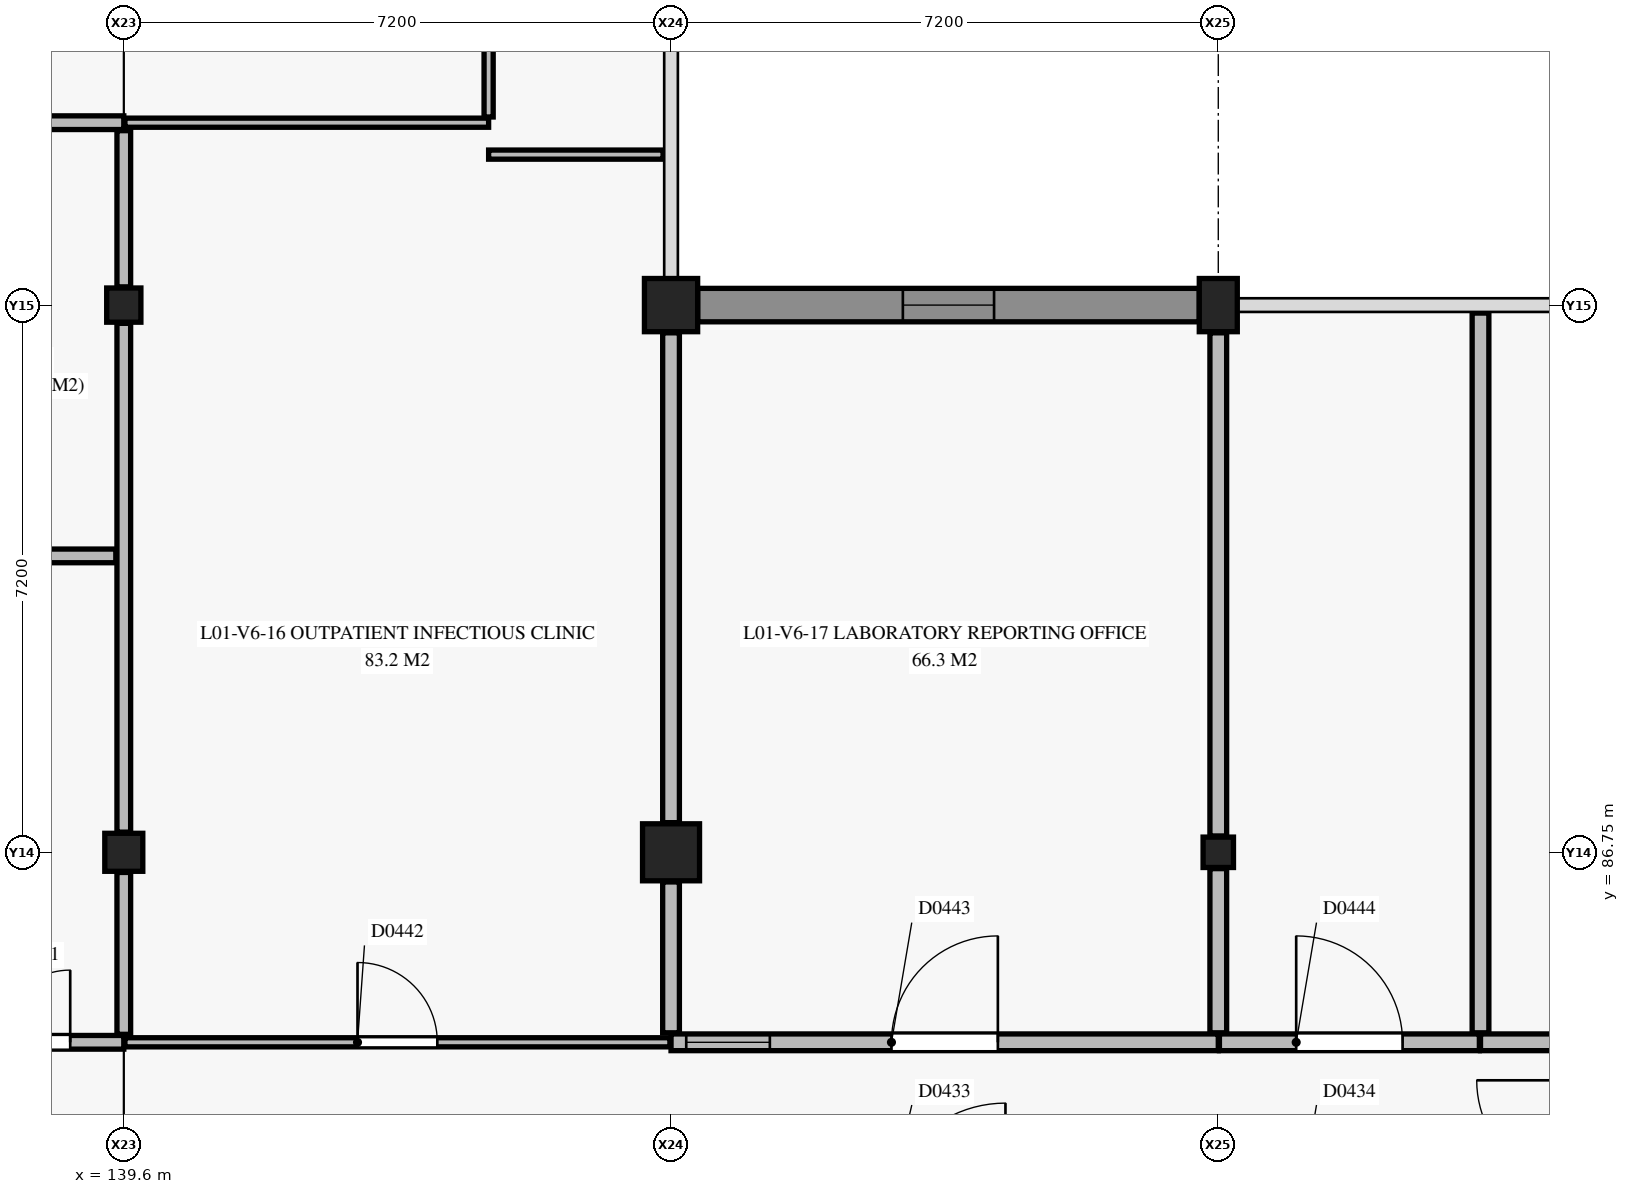
"""IFC4 building model, lengths in metres.
Left out: names, types, materials, properties, quantities, classifications, styles, units other than length and angle.
Written with IfcOpenShell. Run it as: python <this file> out.ifc"""

import sys

from ifc_helpers import new_model, si_unit, direction, frame, frame_2d, origin, origin_2d, place, context, subcontext, project, spatial, rectangle, extrude, element, fill, save


model = new_model("IFC4")
c1 = context("Model", 3, precision=1e-05, world=origin(), true_north=direction((0.0, 1.0)))
c2 = subcontext(c1, "Body", "Model", "MODEL_VIEW")
j1 = project(units=[si_unit("LENGTHUNIT", "METRE"), si_unit("PLANEANGLEUNIT", "RADIAN")], contexts=[c1])
p1 = place(None, origin())
s1 = spatial("IfcSite", under=j1, at=p1, CompositionType="ELEMENT")
p2 = place(p1, origin())
s2 = spatial("IfcBuilding", under=s1, at=p2, CompositionType="ELEMENT")
p3 = place(p2, frame((0.0, 0.0, 4.8)))
s3 = spatial("IfcBuildingStorey", under=s2, at=p3, CompositionType="ELEMENT", Elevation=4.8)
p4 = place(p3, frame((139.6, 86.75, 0.0), z_axis=(0.0, 0.0, 1.0), x_axis=(1.0, 0.0, 0.0)))
e1 = element("IfcColumn", 1, at=p4, inside=s3, PredefinedType="COLUMN", context=c2, shape_type="SweptSolid", body=[
    extrude(rectangle(XDim=0.5, YDim=0.5, at=origin_2d()), origin(), (0.0, 0.0, 1.0), 4.2),
])
p5 = place(p3, frame((139.6, 93.95, 0.0), z_axis=(0.0, 0.0, 1.0), x_axis=(1.0, 0.0, 0.0)))
e2 = element("IfcColumn", 2, at=p5, inside=s3, PredefinedType="COLUMN", context=c2, shape_type="SweptSolid", body=[
    extrude(rectangle(XDim=0.45, YDim=0.45, at=origin_2d()), origin(), (0.0, 0.0, 1.0), 4.2),
])
p6 = place(p3, frame((146.8, 86.75, 0.0), z_axis=(0.0, 0.0, 1.0), x_axis=(1.0, 0.0, 0.0)))
e3 = element("IfcColumn", 3, at=p6, inside=s3, PredefinedType="COLUMN", context=c2, shape_type="SweptSolid", body=[
    extrude(rectangle(XDim=0.75, YDim=0.75, at=origin_2d()), origin(), (0.0, 0.0, 1.0), 4.2),
])
p7 = place(p3, frame((146.8, 93.95, 0.0), z_axis=(0.0, 0.0, 1.0), x_axis=(1.0, 0.0, 0.0)))
e4 = element("IfcColumn", 4, at=p7, inside=s3, PredefinedType="COLUMN", context=c2, shape_type="SweptSolid", body=[
    extrude(rectangle(XDim=0.7, YDim=0.7, at=origin_2d()), origin(), (0.0, 0.0, 1.0), 4.2),
])
p8 = place(p3, frame((154.0, 86.75, 0.0), z_axis=(0.0, 0.0, 1.0), x_axis=(1.0, 0.0, 0.0)))
e5 = element("IfcColumn", 5, at=p8, inside=s3, PredefinedType="COLUMN", context=c2, shape_type="SweptSolid", body=[
    extrude(rectangle(XDim=0.4, YDim=0.4, at=origin_2d()), origin(), (0.0, 0.0, 1.0), 4.2),
])
p9 = place(p3, frame((154.0, 93.95, 0.0), z_axis=(0.0, 0.0, 1.0), x_axis=(1.0, 0.0, 0.0)))
e6 = element("IfcColumn", 6, at=p9, inside=s3, PredefinedType="COLUMN", context=c2, shape_type="SweptSolid", body=[
    extrude(rectangle(XDim=0.5, YDim=0.7, at=origin_2d()), origin(), (0.0, 0.0, 1.0), 4.2),
])
p10 = place(p3, frame((147.15, 93.95, 0.0), z_axis=(0.0, 0.0, 1.0), x_axis=(1.0, 0.0, 0.0)))
e7 = element("IfcWall", 7, at=p10, inside=s3, PredefinedType="USERDEFINED", context=c2, shape_type="SweptSolid", body=[
    extrude(rectangle(XDim=6.6, YDim=0.44, at=frame_2d((3.3, 0.0))), origin(), (0.0, 0.0, 1.0), 3.13),
])
p11 = place(p10, frame((2.7, 0.0, 0.9)))
e8 = element("IfcOpeningElement", 8, at=p11, cuts=e7, PredefinedType="OPENING", context=c2, shape_type="SweptSolid", body=[
    extrude(rectangle(XDim=1.2, YDim=1.5, at=frame_2d((0.6, 0.75))), frame((0.0, 0.23, 0.0), z_axis=(0.0, -1.0, 0.0), x_axis=(1.0, 0.0, 0.0)), (0.0, 0.0, 1.0), 0.46),
])
p12 = place(p3, frame((157.45, 84.25, 0.0), z_axis=(0.0, 0.0, 1.0), x_axis=(1.0, 0.0, 0.0)))
e9 = element("IfcWall", 9, at=p12, inside=s3, PredefinedType="PARTITIONING", context=c2, shape_type="SweptSolid", body=[
    extrude(rectangle(XDim=1.35, YDim=0.22, at=frame_2d((0.675, 0.0))), origin(), (0.0, 0.0, 1.0), 3.95),
])
p13 = place(p3, frame((146.8, 84.25, 0.0), z_axis=(0.0, 0.0, 1.0), x_axis=(1.0, 0.0, 0.0)))
e10 = element("IfcWall", 10, at=p13, inside=s3, PredefinedType="PARTITIONING", context=c2, shape_type="SweptSolid", body=[
    extrude(rectangle(XDim=7.2, YDim=0.22, at=frame_2d((3.6, 0.0))), origin(), (0.0, 0.0, 1.0), 3.355),
])
p14 = place(p13, frame((2.9, 0.0, 0.0)))
e11 = element("IfcOpeningElement", 11, at=p14, cuts=e10, PredefinedType="OPENING", context=c2, shape_type="SweptSolid", body=[
    extrude(rectangle(XDim=1.4, YDim=2.2, at=frame_2d((0.7, 1.1))), frame((0.0, 0.12, 0.0), z_axis=(0.0, -1.0, 0.0), x_axis=(1.0, 0.0, 0.0)), (0.0, 0.0, 1.0), 0.24),
])
p15 = place(p13, frame((0.2, 0.0, 1.05)))
e12 = element("IfcOpeningElement", 12, at=p15, cuts=e10, PredefinedType="OPENING", context=c2, shape_type="SweptSolid", body=[
    extrude(rectangle(XDim=1.1, YDim=1.1, at=frame_2d((0.55, 0.55))), frame((0.0, 0.12, 0.0), z_axis=(0.0, -1.0, 0.0), x_axis=(1.0, 0.0, 0.0)), (0.0, 0.0, 1.0), 0.24),
])
p16 = place(p3, frame((154.015, 84.25, 0.0), z_axis=(0.0, 0.0, 1.0), x_axis=(1.0, 0.0, 0.0)))
e13 = element("IfcWall", 13, at=p16, inside=s3, PredefinedType="PARTITIONING", context=c2, shape_type="SweptSolid", body=[
    extrude(rectangle(XDim=3.42, YDim=0.22, at=frame_2d((1.71, 0.0))), origin(), (0.0, 0.0, 1.0), 3.355),
])
p17 = place(p16, frame((1.01, 0.0, 0.0)))
e14 = element("IfcOpeningElement", 14, at=p17, cuts=e13, PredefinedType="OPENING", context=c2, shape_type="SweptSolid", body=[
    extrude(rectangle(XDim=1.4, YDim=2.2, at=frame_2d((0.7, 1.1))), frame((0.0, 0.12, 0.0), z_axis=(0.0, -1.0, 0.0), x_axis=(1.0, 0.0, 0.0)), (0.0, 0.0, 1.0), 0.24),
])
p18 = place(p3, frame((137.24, 84.25, 0.0), z_axis=(0.0, 0.0, 1.0), x_axis=(1.0, 0.0, 0.0)))
e15 = element("IfcWall", 15, at=p18, inside=s3, PredefinedType="PLUMBINGWALL", context=c2, shape_type="SweptSolid", body=[
    extrude(rectangle(XDim=2.36, YDim=0.18, at=frame_2d((1.18, 0.0))), origin(), (0.0, 0.0, 1.0), 3.235),
])
p19 = place(p18, frame((0.705, 0.0, 0.0)))
e16 = element("IfcOpeningElement", 16, at=p19, cuts=e15, PredefinedType="OPENING", context=c2, shape_type="SweptSolid", body=[
    extrude(rectangle(XDim=0.95, YDim=2.1, at=frame_2d((0.475, 1.05))), frame((0.0, 0.1, 0.0), z_axis=(0.0, -1.0, 0.0), x_axis=(1.0, 0.0, 0.0)), (0.0, 0.0, 1.0), 0.2),
])
p20 = place(p3, frame((135.665, 96.35, 0.0), z_axis=(0.0, 0.0, 1.0), x_axis=(1.0, 0.0, 0.0)))
e17 = element("IfcWall", 17, at=p20, inside=s3, PredefinedType="PLUMBINGWALL", context=c2, shape_type="SweptSolid", body=[
    extrude(rectangle(XDim=3.935, YDim=0.18, at=frame_2d((1.968, 0.0))), origin(), (0.0, 0.0, 1.0), 3.355),
])
p21 = place(p20, frame((1.492, 0.0, 0.0)))
e18 = element("IfcOpeningElement", 18, at=p21, cuts=e17, PredefinedType="OPENING", context=c2, shape_type="SweptSolid", body=[
    extrude(rectangle(XDim=0.95, YDim=2.1, at=frame_2d((0.475, 1.05))), frame((0.0, 0.1, 0.0), z_axis=(0.0, -1.0, 0.0), x_axis=(1.0, 0.0, 0.0)), (0.0, 0.0, 1.0), 0.2),
])
p22 = place(p3, frame((139.615, 84.25, 0.0), z_axis=(0.0, 0.0, 1.0), x_axis=(1.0, 0.0, 0.0)))
e19 = element("IfcWall", 19, at=p22, inside=s3, PredefinedType="PARTITIONING", context=c2, shape_type="SweptSolid", body=[
    extrude(rectangle(XDim=7.17, YDim=0.12, at=frame_2d((3.585, 0.0))), origin(), (0.0, 0.0, 1.0), 3.235),
])
p23 = place(p22, frame((3.06, 0.0, 0.0)))
e20 = element("IfcOpeningElement", 20, at=p23, cuts=e19, PredefinedType="OPENING", context=c2, shape_type="SweptSolid", body=[
    extrude(rectangle(XDim=1.05, YDim=2.15, at=frame_2d((0.525, 1.075))), frame((0.0, 0.07, 0.0), z_axis=(0.0, -1.0, 0.0), x_axis=(1.0, 0.0, 0.0)), (0.0, 0.0, 1.0), 0.14),
])
p24 = place(p3, frame((139.615, 96.35, 0.0), z_axis=(0.0, 0.0, 1.0), x_axis=(1.0, 0.0, 0.0)))
e21 = element("IfcWall", 21, at=p24, inside=s3, PredefinedType="PARTITIONING", context=c2, shape_type="SweptSolid", body=[
    extrude(rectangle(XDim=4.785, YDim=0.12, at=frame_2d((2.393, 0.0))), origin(), (0.0, 0.0, 1.0), 3.355),
])
p25 = place(p3, frame((144.4, 96.425, 0.0), z_axis=(0.0, 0.0, 1.0), x_axis=(0.0, 1.0, 0.0)))
e22 = element("IfcWall", 22, at=p25, inside=s3, PredefinedType="PARTITIONING", context=c2, shape_type="SweptSolid", body=[
    extrude(rectangle(XDim=2.325, YDim=0.12, at=frame_2d((1.163, 0.0))), origin(), (0.0, 0.0, 1.0), 3.515),
])
p26 = place(p3, frame((157.45, 84.375, 0.0), z_axis=(0.0, 0.0, 1.0), x_axis=(0.0, 1.0, 0.0)))
e23 = element("IfcWall", 23, at=p26, inside=s3, PredefinedType="PARTITIONING", context=c2, shape_type="SweptSolid", body=[
    extrude(rectangle(XDim=9.47, YDim=0.22, at=frame_2d((4.735, 0.0))), origin(), (0.0, 0.0, 1.0), 3.48),
])
p27 = place(p3, frame((146.8, 84.375, 0.0), z_axis=(0.0, 0.0, 1.0), x_axis=(0.0, 1.0, 0.0)))
e24 = element("IfcWall", 24, at=p27, inside=s3, PredefinedType="PARTITIONING", context=c2, shape_type="SweptSolid", body=[
    extrude(rectangle(XDim=1.985, YDim=0.22, at=frame_2d((0.993, 0.0))), origin(), (0.0, 0.0, 1.0), 3.385),
])
p28 = place(p3, frame((146.8, 87.14, 0.0), z_axis=(0.0, 0.0, 1.0), x_axis=(0.0, 1.0, 0.0)))
e25 = element("IfcWall", 25, at=p28, inside=s3, PredefinedType="PARTITIONING", context=c2, shape_type="SweptSolid", body=[
    extrude(rectangle(XDim=6.445, YDim=0.22, at=frame_2d((3.223, 0.0))), origin(), (0.0, 0.0, 1.0), 3.135),
])
p29 = place(p3, frame((154.0, 84.375, 0.0), z_axis=(0.0, 0.0, 1.0), x_axis=(0.0, 1.0, 0.0)))
e26 = element("IfcWall", 26, at=p29, inside=s3, PredefinedType="PARTITIONING", context=c2, shape_type="SweptSolid", body=[
    extrude(rectangle(XDim=2.16, YDim=0.22, at=frame_2d((1.08, 0.0))), origin(), (0.0, 0.0, 1.0), 3.355),
])
p30 = place(p3, frame((154.0, 86.965, 0.0), z_axis=(0.0, 0.0, 1.0), x_axis=(0.0, 1.0, 0.0)))
e27 = element("IfcWall", 27, at=p30, inside=s3, PredefinedType="PARTITIONING", context=c2, shape_type="SweptSolid", body=[
    extrude(rectangle(XDim=6.62, YDim=0.22, at=frame_2d((3.31, 0.0))), origin(), (0.0, 0.0, 1.0), 3.355),
])
p31 = place(p3, frame((139.6, 84.355, 0.0), z_axis=(0.0, 0.0, 1.0), x_axis=(0.0, 1.0, 0.0)))
e28 = element("IfcWall", 28, at=p31, inside=s3, PredefinedType="PLUMBINGWALL", context=c2, shape_type="SweptSolid", body=[
    extrude(rectangle(XDim=2.13, YDim=0.18, at=frame_2d((1.065, 0.0))), origin(), (0.0, 0.0, 1.0), 3.235),
])
p32 = place(p3, frame((139.6, 87.015, 0.0), z_axis=(0.0, 0.0, 1.0), x_axis=(0.0, 1.0, 0.0)))
e29 = element("IfcWall", 29, at=p32, inside=s3, PredefinedType="PLUMBINGWALL", context=c2, shape_type="SweptSolid", body=[
    extrude(rectangle(XDim=6.695, YDim=0.18, at=frame_2d((3.348, 0.0))), origin(), (0.0, 0.0, 1.0), 3.355),
])
p33 = place(p3, frame((139.6, 94.19, 0.0), z_axis=(0.0, 0.0, 1.0), x_axis=(0.0, 1.0, 0.0)))
e30 = element("IfcWall", 30, at=p33, inside=s3, PredefinedType="PLUMBINGWALL", context=c2, shape_type="SweptSolid", body=[
    extrude(rectangle(XDim=2.055, YDim=0.18, at=frame_2d((1.028, 0.0))), origin(), (0.0, 0.0, 1.0), 3.355),
])
p34 = place(p3, frame((137.24, 90.65, 0.0), z_axis=(0.0, 0.0, 1.0), x_axis=(1.0, 0.0, 0.0)))
e31 = element("IfcWall", 31, at=p34, inside=s3, PredefinedType="PLUMBINGWALL", context=c2, shape_type="SweptSolid", body=[
    extrude(rectangle(XDim=2.255, YDim=0.18, at=frame_2d((1.127, 0.0))), origin(), (0.0, 0.0, 1.0), 3.355),
])
p35 = place(p3, frame((144.4, 95.93, 0.0), z_axis=(0.0, 0.0, 1.0), x_axis=(1.0, 0.0, 0.0)))
e32 = element("IfcWall", 32, at=p35, inside=s3, PredefinedType="PARTITIONING", context=c2, shape_type="SweptSolid", body=[
    extrude(rectangle(XDim=2.295, YDim=0.12, at=frame_2d((1.147, 0.0))), origin(), (0.0, 0.0, 1.0), 3.235),
])
p36 = place(p11, origin())
e33 = element("IfcWindow", 33, at=p36, inside=s3, PartitioningType="SINGLE_PANEL", PredefinedType="WINDOW", context=c2, shape_type="SweptSolid", body=[
    extrude(rectangle(XDim=1.2, YDim=1.5, at=frame_2d((0.6, 0.75))), frame((0.0, 0.03, 0.0), z_axis=(0.0, -1.0, 0.0), x_axis=(1.0, 0.0, 0.0)), (0.0, 0.0, 1.0), 0.06),
])
fill(e8, e33)
p37 = place(p19, origin())
e34 = element("IfcDoor", 34, at=p37, inside=s3, OperationType="SINGLE_SWING_RIGHT", PredefinedType="DOOR", context=c2, shape_type="SweptSolid", body=[
    extrude(rectangle(XDim=0.95, YDim=2.1, at=frame_2d((0.475, 1.05))), frame((0.0, 0.025, 0.0), z_axis=(0.0, -1.0, 0.0), x_axis=(1.0, 0.0, 0.0)), (0.0, 0.0, 1.0), 0.05),
])
fill(e16, e34)
p38 = place(p23, origin())
e35 = element("IfcDoor", 35, at=p38, inside=s3, OperationType="SINGLE_SWING_LEFT", PredefinedType="DOOR", context=c2, shape_type="SweptSolid", body=[
    extrude(rectangle(XDim=1.05, YDim=2.15, at=frame_2d((0.525, 1.075))), frame((0.0, 0.025, 0.0), z_axis=(0.0, -1.0, 0.0), x_axis=(1.0, 0.0, 0.0)), (0.0, 0.0, 1.0), 0.05),
])
fill(e20, e35)
p39 = place(p14, origin())
e36 = element("IfcDoor", 36, at=p39, inside=s3, OperationType="SINGLE_SWING_RIGHT", PredefinedType="DOOR", context=c2, shape_type="SweptSolid", body=[
    extrude(rectangle(XDim=1.4, YDim=2.2, at=frame_2d((0.7, 1.1))), frame((0.0, 0.025, 0.0), z_axis=(0.0, -1.0, 0.0), x_axis=(1.0, 0.0, 0.0)), (0.0, 0.0, 1.0), 0.05),
])
fill(e11, e36)
p40 = place(p15, origin())
e37 = element("IfcWindow", 37, at=p40, inside=s3, PartitioningType="SINGLE_PANEL", PredefinedType="WINDOW", context=c2, shape_type="SweptSolid", body=[
    extrude(rectangle(XDim=1.1, YDim=1.1, at=frame_2d((0.55, 0.55))), frame((0.0, 0.03, 0.0), z_axis=(0.0, -1.0, 0.0), x_axis=(1.0, 0.0, 0.0)), (0.0, 0.0, 1.0), 0.06),
])
fill(e12, e37)
p41 = place(p17, origin())
e38 = element("IfcDoor", 38, at=p41, inside=s3, OperationType="SINGLE_SWING_LEFT", PredefinedType="DOOR", context=c2, shape_type="SweptSolid", body=[
    extrude(rectangle(XDim=1.4, YDim=2.2, at=frame_2d((0.7, 1.1))), frame((0.0, 0.025, 0.0), z_axis=(0.0, -1.0, 0.0), x_axis=(1.0, 0.0, 0.0)), (0.0, 0.0, 1.0), 0.05),
])
fill(e14, e38)
save(model, sys.argv[1])
